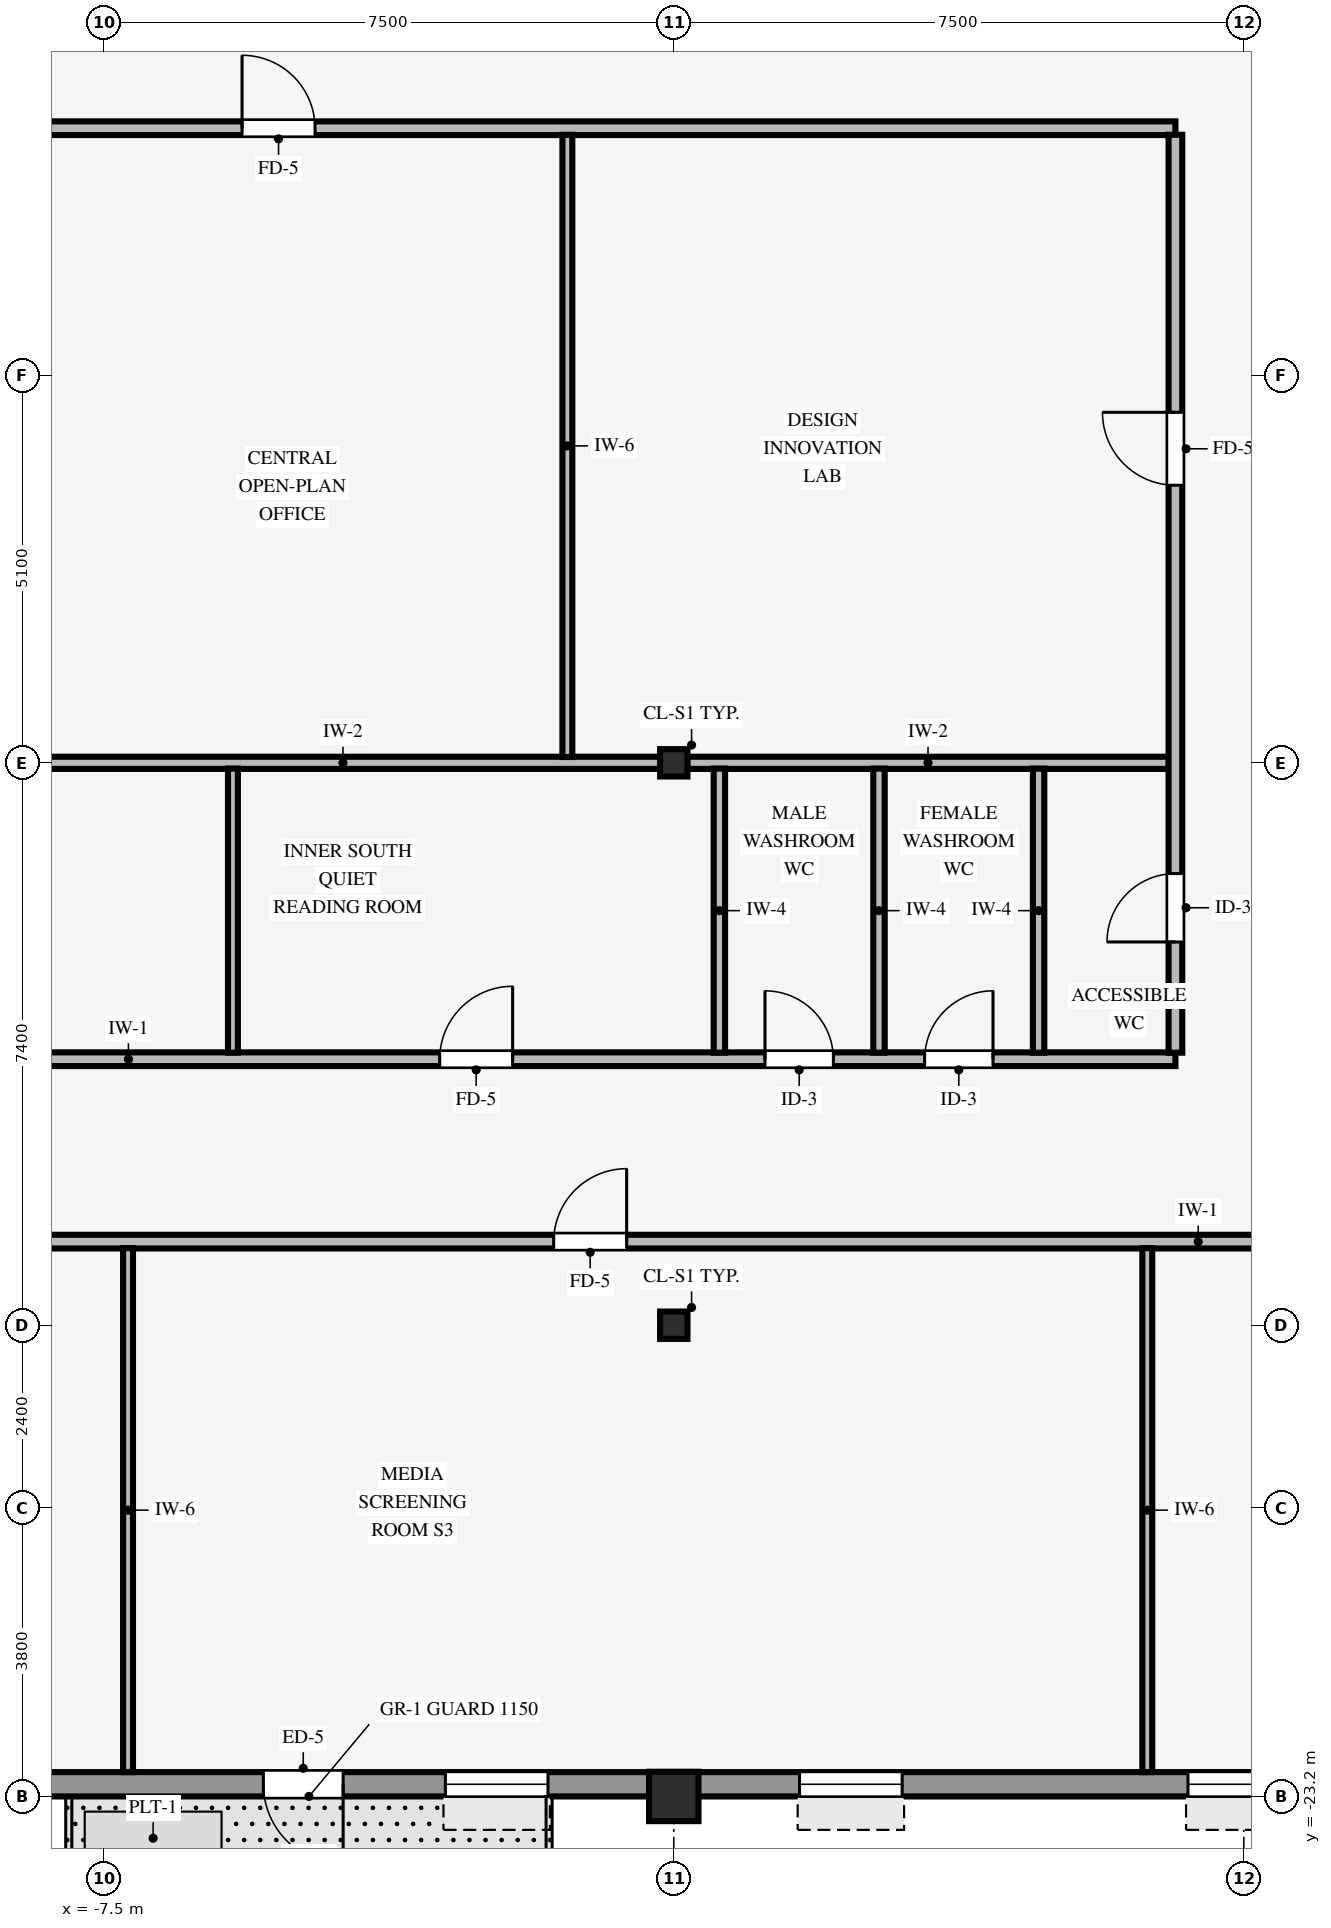
"""IFC4 building model, lengths in metres.
Left out: names, types, materials, properties, quantities, classifications, styles, units other than length and angle.
Written with IfcOpenShell. Run it as: python <this file> out.ifc"""

import sys

from ifc_helpers import new_model, si_unit, direction, frame, frame_2d, origin, origin_2d, place, context, subcontext, project, spatial, rectangle, hollow_rectangle, i_section, extrude, source, transform, mapped, element, fill, save


model = new_model("IFC4")
c1 = context("Model", 3, precision=1e-05, world=origin(), true_north=direction((0.0, 1.0)))
c2 = subcontext(c1, "Body", "Model", "MODEL_VIEW")
j1 = project(units=[si_unit("LENGTHUNIT", "METRE"), si_unit("PLANEANGLEUNIT", "RADIAN")], contexts=[c1])
p1 = place(None, origin())
s1 = spatial("IfcSite", under=j1, at=p1, CompositionType="ELEMENT")
p2 = place(p1, origin())
s2 = spatial("IfcBuilding", under=s1, at=p2, CompositionType="ELEMENT")
p3 = place(p2, frame((0.0, 0.0, 149.4)))
s3 = spatial("IfcBuildingStorey", under=s2, at=p3, CompositionType="ELEMENT", Elevation=149.4)
p4 = place(p3, frame((0.0, -23.2, 0.0), z_axis=(0.0, 0.0, 1.0), x_axis=(1.0, 0.0, 0.0)))
e1 = element("IfcColumn", 1, at=p4, inside=s3, PredefinedType="COLUMN", context=c2, shape_type="SweptSolid", body=[
    extrude(hollow_rectangle(XDim=0.65, YDim=0.65, WallThickness=0.04, InnerFilletRadius=0.04, OuterFilletRadius=0.08, at=origin_2d()), origin(), (0.0, 0.0, 1.0), 3.37),
])
for number, where, z_axis, x_axis in (
    (2, (0.0, -17.0, 0.0), (0.0, 0.0, 1.0), (1.0, 0.0, 0.0)),
    (3, (0.0, -9.6, 0.0), (0.0, 0.0, 1.0), (1.0, 0.0, 0.0)),
):
    element("IfcColumn", number, at=place(p3, frame(where, z_axis=z_axis, x_axis=x_axis)), inside=s3, PredefinedType="COLUMN", context=c2, shape_type="SweptSolid", body=[
        extrude(i_section(OverallWidth=0.36, OverallDepth=0.36, WebThickness=0.021, FlangeThickness=0.021, FilletRadius=0.018, at=origin_2d()), origin(), (0.0, 0.0, 1.0), 3.37),
    ])
p5 = place(p3, frame((-24.3, -23.04, 0.0), z_axis=(0.0, 0.0, 1.0), x_axis=(1.0, 0.0, 0.0)))
e4 = element("IfcWall", 4, at=p5, inside=s3, PredefinedType="STANDARD", context=c2, shape_type="SweptSolid", body=[
    extrude(rectangle(XDim=48.6, YDim=0.32, at=frame_2d((24.3, 0.0))), origin(), (0.0, 0.0, 1.0), 2.705),
])
p6 = place(p5, frame((19.95, 0.0, 0.0), z_axis=(0.0, 0.0, 1.0), x_axis=(-1.0, 0.0, 0.0)))
e5 = element("IfcOpeningElement", 5, at=p6, cuts=e4, PredefinedType="OPENING", context=c2, shape_type="SweptSolid", body=[
    extrude(rectangle(XDim=1.05, YDim=2.1, at=frame_2d((0.525, 1.05))), frame((0.0, 0.17, 0.0), z_axis=(0.0, -1.0, 0.0), x_axis=(1.0, 0.0, 0.0)), (0.0, 0.0, 1.0), 0.34),
])
p7 = place(p5, frame((2.655, 0.0, 0.8)))
e6 = element("IfcOpeningElement", 6, at=p7, cuts=e4, PredefinedType="OPENING", context=c2, shape_type="SweptSolid", body=[
    extrude(rectangle(XDim=1.35, YDim=1.56, at=frame_2d((0.675, 0.78))), frame((0.0, 0.17, 0.0), z_axis=(0.0, -1.0, 0.0), x_axis=(1.0, 0.0, 0.0)), (0.0, 0.0, 1.0), 0.34),
])
p8 = place(p5, frame((7.315, 0.0, 0.8)))
e7 = element("IfcOpeningElement", 7, at=p8, cuts=e4, PredefinedType="OPENING", context=c2, shape_type="SweptSolid", body=[
    extrude(rectangle(XDim=1.35, YDim=1.56, at=frame_2d((0.675, 0.78))), frame((0.0, 0.17, 0.0), z_axis=(0.0, -1.0, 0.0), x_axis=(1.0, 0.0, 0.0)), (0.0, 0.0, 1.0), 0.34),
])
p9 = place(p5, frame((11.975, 0.0, 0.8)))
e8 = element("IfcOpeningElement", 8, at=p9, cuts=e4, PredefinedType="OPENING", context=c2, shape_type="SweptSolid", body=[
    extrude(rectangle(XDim=1.35, YDim=1.56, at=frame_2d((0.675, 0.78))), frame((0.0, 0.17, 0.0), z_axis=(0.0, -1.0, 0.0), x_axis=(1.0, 0.0, 0.0)), (0.0, 0.0, 1.0), 0.34),
])
p10 = place(p5, frame((21.295, 0.0, 0.8)))
e9 = element("IfcOpeningElement", 9, at=p10, cuts=e4, PredefinedType="OPENING", context=c2, shape_type="SweptSolid", body=[
    extrude(rectangle(XDim=1.35, YDim=1.56, at=frame_2d((0.675, 0.78))), frame((0.0, 0.17, 0.0), z_axis=(0.0, -1.0, 0.0), x_axis=(1.0, 0.0, 0.0)), (0.0, 0.0, 1.0), 0.34),
])
p11 = place(p5, frame((25.955, 0.0, 0.8)))
e10 = element("IfcOpeningElement", 10, at=p11, cuts=e4, PredefinedType="OPENING", context=c2, shape_type="SweptSolid", body=[
    extrude(rectangle(XDim=1.35, YDim=1.56, at=frame_2d((0.675, 0.78))), frame((0.0, 0.17, 0.0), z_axis=(0.0, -1.0, 0.0), x_axis=(1.0, 0.0, 0.0)), (0.0, 0.0, 1.0), 0.34),
])
p12 = place(p5, frame((31.065, 0.0, 0.8)))
e11 = element("IfcOpeningElement", 11, at=p12, cuts=e4, PredefinedType="OPENING", context=c2, shape_type="SweptSolid", body=[
    extrude(rectangle(XDim=1.35, YDim=1.56, at=frame_2d((0.675, 0.78))), frame((0.0, 0.17, 0.0), z_axis=(0.0, -1.0, 0.0), x_axis=(1.0, 0.0, 0.0)), (0.0, 0.0, 1.0), 0.34),
])
p13 = place(p5, frame((35.275, 0.0, 0.8)))
e12 = element("IfcOpeningElement", 12, at=p13, cuts=e4, PredefinedType="OPENING", context=c2, shape_type="SweptSolid", body=[
    extrude(rectangle(XDim=1.35, YDim=1.56, at=frame_2d((0.675, 0.78))), frame((0.0, 0.17, 0.0), z_axis=(0.0, -1.0, 0.0), x_axis=(1.0, 0.0, 0.0)), (0.0, 0.0, 1.0), 0.34),
])
p14 = place(p5, frame((39.935, 0.0, 0.8)))
e13 = element("IfcOpeningElement", 13, at=p14, cuts=e4, PredefinedType="OPENING", context=c2, shape_type="SweptSolid", body=[
    extrude(rectangle(XDim=1.35, YDim=1.56, at=frame_2d((0.675, 0.78))), frame((0.0, 0.17, 0.0), z_axis=(0.0, -1.0, 0.0), x_axis=(1.0, 0.0, 0.0)), (0.0, 0.0, 1.0), 0.34),
])
p15 = place(p5, frame((44.595, 0.0, 0.8)))
e14 = element("IfcOpeningElement", 14, at=p15, cuts=e4, PredefinedType="OPENING", context=c2, shape_type="SweptSolid", body=[
    extrude(rectangle(XDim=1.35, YDim=1.56, at=frame_2d((0.675, 0.78))), frame((0.0, 0.17, 0.0), z_axis=(0.0, -1.0, 0.0), x_axis=(1.0, 0.0, 0.0)), (0.0, 0.0, 1.0), 0.34),
])
p16 = place(p3, frame((-26.08, -15.9, 0.0), z_axis=(0.0, 0.0, 1.0), x_axis=(1.0, 0.0, 0.0)))
e15 = element("IfcWall", 15, at=p16, inside=s3, PredefinedType="PARTITIONING", context=c2, shape_type="SweptSolid", body=[
    extrude(rectangle(XDim=52.16, YDim=0.18, at=frame_2d((26.08, 0.0))), origin(), (0.0, 0.0, 1.0), 3.36),
])
p17 = place(p16, frame((24.5, 0.0, 0.0)))
e16 = element("IfcOpeningElement", 16, at=p17, cuts=e15, PredefinedType="OPENING", context=c2, shape_type="SweptSolid", body=[
    extrude(rectangle(XDim=0.96, YDim=2.1, at=frame_2d((0.48, 1.05))), frame((0.0, 0.1, 0.0), z_axis=(0.0, -1.0, 0.0), x_axis=(1.0, 0.0, 0.0)), (0.0, 0.0, 1.0), 0.2),
])
p18 = place(p16, frame((40.5, 0.0, 0.0)))
e17 = element("IfcOpeningElement", 17, at=p18, cuts=e15, PredefinedType="OPENING", context=c2, shape_type="SweptSolid", body=[
    extrude(rectangle(XDim=0.96, YDim=2.1, at=frame_2d((0.48, 1.05))), frame((0.0, 0.1, 0.0), z_axis=(0.0, -1.0, 0.0), x_axis=(1.0, 0.0, 0.0)), (0.0, 0.0, 1.0), 0.2),
])
p19 = place(p16, frame((13.16, 0.0, 0.0)))
e18 = element("IfcOpeningElement", 18, at=p19, cuts=e15, PredefinedType="OPENING", context=c2, shape_type="SweptSolid", body=[
    extrude(rectangle(XDim=0.96, YDim=2.1, at=frame_2d((0.48, 1.05))), frame((0.0, 0.1, 0.0), z_axis=(0.0, -1.0, 0.0), x_axis=(1.0, 0.0, 0.0)), (0.0, 0.0, 1.0), 0.2),
])
p20 = place(p16, frame((6.425, 0.0, 0.0)))
e19 = element("IfcOpeningElement", 19, at=p20, cuts=e15, PredefinedType="OPENING", context=c2, shape_type="SweptSolid", body=[
    extrude(rectangle(XDim=0.96, YDim=2.1, at=frame_2d((0.48, 1.05))), frame((0.0, 0.1, 0.0), z_axis=(0.0, -1.0, 0.0), x_axis=(1.0, 0.0, 0.0)), (0.0, 0.0, 1.0), 0.2),
])
p21 = place(p3, frame((-17.7, -13.5, 0.0), z_axis=(0.0, 0.0, 1.0), x_axis=(1.0, 0.0, 0.0)))
e20 = element("IfcWall", 20, at=p21, inside=s3, PredefinedType="PARTITIONING", context=c2, shape_type="SweptSolid", body=[
    extrude(rectangle(XDim=24.3, YDim=0.18, at=frame_2d((12.15, 0.0))), origin(), (0.0, 0.0, 1.0), 2.998),
])
p22 = place(p21, frame((5.47, 0.0, 0.0)))
e21 = element("IfcOpeningElement", 21, at=p22, cuts=e20, PredefinedType="OPENING", context=c2, shape_type="SweptSolid", body=[
    extrude(rectangle(XDim=0.96, YDim=2.1, at=frame_2d((0.48, 1.05))), frame((0.0, 0.1, 0.0), z_axis=(0.0, -1.0, 0.0), x_axis=(1.0, 0.0, 0.0)), (0.0, 0.0, 1.0), 0.2),
])
p23 = place(p21, frame((14.62, 0.0, 0.0)))
e22 = element("IfcOpeningElement", 22, at=p23, cuts=e20, PredefinedType="OPENING", context=c2, shape_type="SweptSolid", body=[
    extrude(rectangle(XDim=0.96, YDim=2.1, at=frame_2d((0.48, 1.05))), frame((0.0, 0.1, 0.0), z_axis=(0.0, -1.0, 0.0), x_axis=(1.0, 0.0, 0.0)), (0.0, 0.0, 1.0), 0.2),
])
p24 = place(p21, frame((18.9, 0.0, 0.0)))
e23 = element("IfcOpeningElement", 23, at=p24, cuts=e20, PredefinedType="OPENING", context=c2, shape_type="SweptSolid", body=[
    extrude(rectangle(XDim=0.9, YDim=2.1, at=frame_2d((0.45, 1.05))), frame((0.0, 0.1, 0.0), z_axis=(0.0, -1.0, 0.0), x_axis=(1.0, 0.0, 0.0)), (0.0, 0.0, 1.0), 0.2),
])
p25 = place(p21, frame((21.0, 0.0, 0.0)))
e24 = element("IfcOpeningElement", 24, at=p25, cuts=e20, PredefinedType="OPENING", context=c2, shape_type="SweptSolid", body=[
    extrude(rectangle(XDim=0.9, YDim=2.1, at=frame_2d((0.45, 1.05))), frame((0.0, 0.1, 0.0), z_axis=(0.0, -1.0, 0.0), x_axis=(1.0, 0.0, 0.0)), (0.0, 0.0, 1.0), 0.2),
])
p26 = place(p3, frame((-8.529, -9.6, 0.0), z_axis=(0.0, 0.0, 1.0), x_axis=(1.0, 0.0, 0.0)))
e25 = element("IfcWall", 25, at=p26, inside=s3, PredefinedType="PARTITIONING", context=c2, shape_type="SweptSolid", body=[
    extrude(rectangle(XDim=8.353, YDim=0.16, at=frame_2d((4.177, 0.0))), origin(), (0.0, 0.0, 1.0), 2.405),
])
p27 = place(p3, frame((0.176, -9.6, 0.0), z_axis=(0.0, 0.0, 1.0), x_axis=(1.0, 0.0, 0.0)))
e26 = element("IfcWall", 26, at=p27, inside=s3, PredefinedType="PARTITIONING", context=c2, shape_type="SweptSolid", body=[
    extrude(rectangle(XDim=6.338, YDim=0.16, at=frame_2d((3.169, 0.0))), origin(), (0.0, 0.0, 1.0), 2.405),
])
p28 = place(p3, frame((-9.0, -1.25, 0.0), z_axis=(0.0, 0.0, 1.0), x_axis=(1.0, 0.0, 0.0)))
e27 = element("IfcWall", 27, at=p28, inside=s3, PredefinedType="PARTITIONING", context=c2, shape_type="SweptSolid", body=[
    extrude(rectangle(XDim=15.6, YDim=0.18, at=frame_2d((7.8, 0.0))), origin(), (0.0, 0.0, 1.0), 3.36),
])
p29 = place(p28, frame((3.32, 0.0, 0.0)))
e28 = element("IfcOpeningElement", 28, at=p29, cuts=e27, PredefinedType="OPENING", context=c2, shape_type="SweptSolid", body=[
    extrude(rectangle(XDim=0.96, YDim=2.1, at=frame_2d((0.48, 1.05))), frame((0.0, 0.1, 0.0), z_axis=(0.0, -1.0, 0.0), x_axis=(1.0, 0.0, 0.0)), (0.0, 0.0, 1.0), 0.2),
])
p30 = place(p3, frame((-7.18, -22.88, 0.0), z_axis=(0.0, 0.0, 1.0), x_axis=(0.0, 1.0, 0.0)))
e29 = element("IfcWall", 29, at=p30, inside=s3, PredefinedType="PARTITIONING", context=c2, shape_type="SweptSolid", body=[
    extrude(rectangle(XDim=6.894, YDim=0.13, at=frame_2d((3.447, 0.0))), origin(), (0.0, 0.0, 1.0), 3.36),
])
p31 = place(p3, frame((-5.8, -13.414, 0.0), z_axis=(0.0, 0.0, 1.0), x_axis=(0.0, 1.0, 0.0)))
e30 = element("IfcWall", 30, at=p31, inside=s3, PredefinedType="PARTITIONING", context=c2, shape_type="SweptSolid", body=[
    extrude(rectangle(XDim=3.738, YDim=0.13, at=frame_2d((1.869, 0.0))), origin(), (0.0, 0.0, 1.0), 3.36),
])
p32 = place(p3, frame((-1.4, -9.524, 0.0), z_axis=(0.0, 0.0, 1.0), x_axis=(0.0, 1.0, 0.0)))
e31 = element("IfcWall", 31, at=p32, inside=s3, PredefinedType="PARTITIONING", context=c2, shape_type="SweptSolid", body=[
    extrude(rectangle(XDim=8.188, YDim=0.13, at=frame_2d((4.094, 0.0))), origin(), (0.0, 0.0, 1.0), 3.36),
])
for number, where, z_axis, x_axis in (
    (32, (0.6, -13.414, 0.0), (0.0, 0.0, 1.0), (0.0, 1.0, 0.0)),
    (33, (2.7, -13.414, 0.0), (0.0, 0.0, 1.0), (0.0, 1.0, 0.0)),
    (34, (4.8, -13.414, 0.0), (0.0, 0.0, 1.0), (0.0, 1.0, 0.0)),
):
    element("IfcWall", number, at=place(p3, frame(where, z_axis=z_axis, x_axis=x_axis)), inside=s3, PredefinedType="PARTITIONING", context=c2, shape_type="SweptSolid", body=[
        extrude(rectangle(XDim=3.738, YDim=0.15, at=frame_2d((1.869, 0.0))), origin(), (0.0, 0.0, 1.0), 3.36),
    ])
p33 = place(p3, frame((6.23, -22.88, 0.0), z_axis=(0.0, 0.0, 1.0), x_axis=(0.0, 1.0, 0.0)))
e35 = element("IfcWall", 35, at=p33, inside=s3, PredefinedType="PARTITIONING", context=c2, shape_type="SweptSolid", body=[
    extrude(rectangle(XDim=6.894, YDim=0.13, at=frame_2d((3.447, 0.0))), origin(), (0.0, 0.0, 1.0), 3.36),
])
p34 = place(p3, frame((6.6, -13.414, 0.0), z_axis=(0.0, 0.0, 1.0), x_axis=(0.0, 1.0, 0.0)))
e36 = element("IfcWall", 36, at=p34, inside=s3, PredefinedType="PARTITIONING", context=c2, shape_type="SweptSolid", body=[
    extrude(rectangle(XDim=12.078, YDim=0.18, at=frame_2d((6.039, 0.0))), origin(), (0.0, 0.0, 1.0), 3.36),
])
p35 = place(p34, frame((7.466, 0.0, 0.0)))
e37 = element("IfcOpeningElement", 37, at=p35, cuts=e36, PredefinedType="OPENING", context=c2, shape_type="SweptSolid", body=[
    extrude(rectangle(XDim=0.96, YDim=2.1, at=frame_2d((0.48, 1.05))), frame((0.0, 0.1, 0.0), z_axis=(0.0, -1.0, 0.0), x_axis=(1.0, 0.0, 0.0)), (0.0, 0.0, 1.0), 0.2),
])
p36 = place(p34, frame((1.457, 0.0, 0.0)))
e38 = element("IfcOpeningElement", 38, at=p36, cuts=e36, PredefinedType="OPENING", context=c2, shape_type="SweptSolid", body=[
    extrude(rectangle(XDim=0.9, YDim=2.1, at=frame_2d((0.45, 1.05))), frame((0.0, 0.1, 0.0), z_axis=(0.0, -1.0, 0.0), x_axis=(1.0, 0.0, 0.0)), (0.0, 0.0, 1.0), 0.2),
])
m1 = source(origin(), c2, "Body", "SweptSolid", [
    extrude(rectangle(XDim=1.05, YDim=2.1, at=frame_2d((0.525, 1.05))), frame((0.0, 0.025, 0.0), z_axis=(0.0, -1.0, 0.0), x_axis=(1.0, 0.0, 0.0)), (0.0, 0.0, 1.0), 0.05),
])
p37 = place(p6, origin())
e39 = element("IfcDoor", 39, at=p37, inside=s3, OperationType="SINGLE_SWING_LEFT", PredefinedType="DOOR", context=c2, shape_type="MappedRepresentation", body=[
    mapped(m1, transform((0.0, 0.0, 0.0), scale=1.0)),
])
fill(e5, e39)
m2 = source(origin(), c2, "Body", "SweptSolid", [
    extrude(rectangle(XDim=1.35, YDim=1.56, at=frame_2d((0.675, 0.78))), frame((0.0, 0.03, 0.0), z_axis=(0.0, -1.0, 0.0), x_axis=(1.0, 0.0, 0.0)), (0.0, 0.0, 1.0), 0.06),
])
p38 = place(p10, origin())
e40 = element("IfcWindow", 40, at=p38, inside=s3, PartitioningType="SINGLE_PANEL", PredefinedType="WINDOW", context=c2, shape_type="MappedRepresentation", body=[
    mapped(m2, transform((0.0, 0.0, 0.0), scale=1.0)),
])
fill(e9, e40)
p39 = place(p11, origin())
e41 = element("IfcWindow", 41, at=p39, inside=s3, PartitioningType="SINGLE_PANEL", PredefinedType="WINDOW", context=c2, shape_type="MappedRepresentation", body=[
    mapped(m2, transform((0.0, 0.0, 0.0), scale=1.0)),
])
fill(e10, e41)
p40 = place(p12, origin())
e42 = element("IfcWindow", 42, at=p40, inside=s3, PartitioningType="SINGLE_PANEL", PredefinedType="WINDOW", context=c2, shape_type="MappedRepresentation", body=[
    mapped(m2, transform((0.0, 0.0, 0.0), scale=1.0)),
])
fill(e11, e42)
m3 = source(origin(), c2, "Body", "SweptSolid", [
    extrude(rectangle(XDim=0.96, YDim=2.1, at=frame_2d((0.48, 1.05))), frame((0.0, 0.025, 0.0), z_axis=(0.0, -1.0, 0.0), x_axis=(1.0, 0.0, 0.0)), (0.0, 0.0, 1.0), 0.05),
])
p41 = place(p17, origin())
e43 = element("IfcDoor", 43, at=p41, inside=s3, OperationType="SINGLE_SWING_RIGHT", PredefinedType="DOOR", context=c2, shape_type="MappedRepresentation", body=[
    mapped(m3, transform((0.0, 0.0, 0.0), scale=1.0)),
])
fill(e16, e43)
p42 = place(p35, origin())
e44 = element("IfcDoor", 44, at=p42, inside=s3, OperationType="SINGLE_SWING_RIGHT", PredefinedType="DOOR", context=c2, shape_type="MappedRepresentation", body=[
    mapped(m3, transform((0.0, 0.0, 0.0), scale=1.0)),
])
fill(e37, e44)
p43 = place(p29, origin())
e45 = element("IfcDoor", 45, at=p43, inside=s3, OperationType="SINGLE_SWING_LEFT", PredefinedType="DOOR", context=c2, shape_type="MappedRepresentation", body=[
    mapped(m3, transform((0.0, 0.0, 0.0), scale=1.0)),
])
fill(e28, e45)
p44 = place(p23, origin())
e46 = element("IfcDoor", 46, at=p44, inside=s3, OperationType="SINGLE_SWING_RIGHT", PredefinedType="DOOR", context=c2, shape_type="MappedRepresentation", body=[
    mapped(m3, transform((0.0, 0.0, 0.0), scale=1.0)),
])
fill(e22, e46)
m4 = source(origin(), c2, "Body", "SweptSolid", [
    extrude(rectangle(XDim=0.9, YDim=2.1, at=frame_2d((0.45, 1.05))), frame((0.0, 0.025, 0.0), z_axis=(0.0, -1.0, 0.0), x_axis=(1.0, 0.0, 0.0)), (0.0, 0.0, 1.0), 0.05),
])
p45 = place(p36, origin())
e47 = element("IfcDoor", 47, at=p45, inside=s3, OperationType="SINGLE_SWING_LEFT", PredefinedType="DOOR", context=c2, shape_type="MappedRepresentation", body=[
    mapped(m4, transform((0.0, 0.0, 0.0), scale=1.0)),
])
fill(e38, e47)
p46 = place(p24, origin())
e48 = element("IfcDoor", 48, at=p46, inside=s3, OperationType="SINGLE_SWING_LEFT", PredefinedType="DOOR", context=c2, shape_type="MappedRepresentation", body=[
    mapped(m4, transform((0.0, 0.0, 0.0), scale=1.0)),
])
fill(e23, e48)
p47 = place(p25, origin())
e49 = element("IfcDoor", 49, at=p47, inside=s3, OperationType="SINGLE_SWING_RIGHT", PredefinedType="DOOR", context=c2, shape_type="MappedRepresentation", body=[
    mapped(m4, transform((0.0, 0.0, 0.0), scale=1.0)),
])
fill(e24, e49)
save(model, sys.argv[1])
